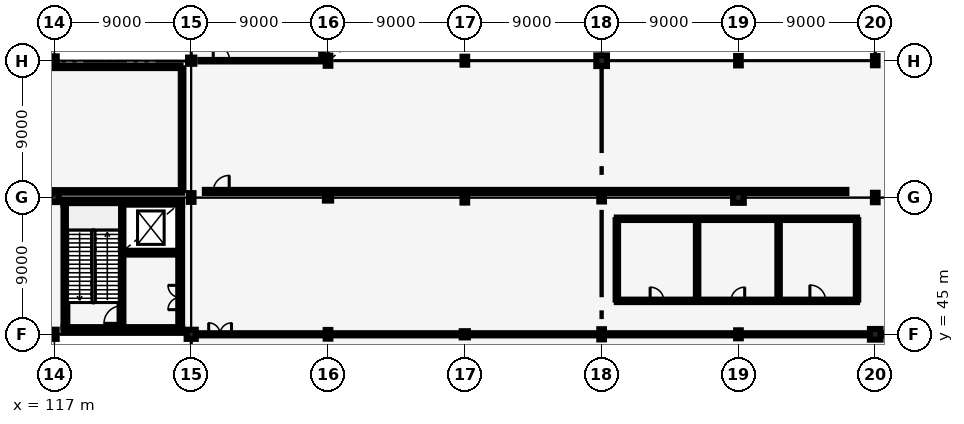
"""IFC4 building model, lengths in metres.
Left out: names, types, materials, properties, quantities, classifications, styles, units other than length and angle.
Written with IfcOpenShell. Run it as: python <this file> out.ifc"""

import sys

from ifc_helpers import new_model, si_unit, direction, frame, frame_2d, origin, origin_2d, place, context, subcontext, project, spatial, rectangle, hollow_circle, i_section, extrude, element, fill, save


model = new_model("IFC4")
c1 = context("Model", 3, precision=1e-05, world=origin(), true_north=direction((0.0, 1.0)))
c2 = subcontext(c1, "Body", "Model", "MODEL_VIEW")
j1 = project(units=[si_unit("LENGTHUNIT", "METRE"), si_unit("PLANEANGLEUNIT", "RADIAN")], contexts=[c1])
p1 = place(None, origin())
s1 = spatial("IfcSite", under=j1, at=p1, CompositionType="ELEMENT")
p2 = place(p1, origin())
s2 = spatial("IfcBuilding", under=s1, at=p2, CompositionType="ELEMENT")
p3 = place(p2, frame((0.0, 0.0, 12.0)))
s3 = spatial("IfcBuildingStorey", under=s2, at=p3, CompositionType="ELEMENT", Elevation=12.0)
p4 = place(p3, frame((117.0, 45.0, 0.0), z_axis=(0.0, 0.0, 1.0), x_axis=(1.0, 0.0, 0.0)))
e1 = element("IfcColumn", 1, at=p4, inside=s3, PredefinedType="COLUMN", context=c2, shape_type="SweptSolid", body=[
    extrude(i_section(OverallWidth=0.3, OverallDepth=0.6, WebThickness=0.015, FlangeThickness=0.03, FilletRadius=0.027, at=origin_2d()), origin(), (0.0, 0.0, 1.0), 6.0),
])
p5 = place(p3, frame((117.0, 54.0, 0.0), z_axis=(0.0, 0.0, 1.0), x_axis=(1.0, 0.0, 0.0)))
e2 = element("IfcColumn", 2, at=p5, inside=s3, PredefinedType="COLUMN", context=c2, shape_type="SweptSolid", body=[
    extrude(rectangle(XDim=0.6, YDim=0.6, at=origin_2d()), origin(), (0.0, 0.0, 1.0), 6.0),
])
p6 = place(p3, frame((117.0, 63.0, 0.0), z_axis=(0.0, 0.0, 1.0), x_axis=(1.0, 0.0, 0.0)))
e3 = element("IfcColumn", 3, at=p6, inside=s3, PredefinedType="COLUMN", context=c2, shape_type="SweptSolid", body=[
    extrude(i_section(OverallWidth=0.306, OverallDepth=0.572, WebThickness=0.021, FlangeThickness=0.04, FilletRadius=0.027, at=origin_2d()), origin(), (0.0, 0.0, 1.0), 5.655),
])
p7 = place(p3, frame((126.0, 45.0, 0.0), z_axis=(0.0, 0.0, 1.0), x_axis=(1.0, 0.0, 0.0)))
e4 = element("IfcColumn", 4, at=p7, inside=s3, PredefinedType="COLUMN", context=c2, shape_type="SweptSolid", body=[
    extrude(rectangle(XDim=0.6, YDim=0.6, at=origin_2d()), origin(), (0.0, 0.0, 1.0), 6.0),
])
p8 = place(p3, frame((126.0, 54.0, 0.0), z_axis=(0.0, 0.0, 1.0), x_axis=(1.0, 0.0, 0.0)))
e5 = element("IfcColumn", 5, at=p8, inside=s3, PredefinedType="COLUMN", context=c2, shape_type="SweptSolid", body=[
    extrude(i_section(OverallWidth=0.306, OverallDepth=0.572, WebThickness=0.021, FlangeThickness=0.04, FilletRadius=0.027, at=origin_2d()), origin(), (0.0, 0.0, 1.0), 6.0),
])
p9 = place(p3, frame((126.0, 63.0, 0.0), z_axis=(0.0, 0.0, 1.0), x_axis=(1.0, 0.0, 0.0)))
e6 = element("IfcColumn", 6, at=p9, inside=s3, PredefinedType="COLUMN", context=c2, shape_type="SweptSolid", body=[
    extrude(hollow_circle(Radius=0.203, WallThickness=0.016, at=origin_2d()), origin(), (0.0, 0.0, 1.0), 6.0),
])
p10 = place(p3, frame((135.0, 45.0, 0.0), z_axis=(0.0, 0.0, 1.0), x_axis=(1.0, 0.0, 0.0)))
e7 = element("IfcColumn", 7, at=p10, inside=s3, PredefinedType="COLUMN", context=c2, shape_type="SweptSolid", body=[
    extrude(i_section(OverallWidth=0.306, OverallDepth=0.572, WebThickness=0.021, FlangeThickness=0.04, FilletRadius=0.027, at=origin_2d()), origin(), (0.0, 0.0, 1.0), 6.0),
])
p11 = place(p3, frame((135.0, 54.0, 0.0), z_axis=(0.0, 0.0, 1.0), x_axis=(1.0, 0.0, 0.0)))
e8 = element("IfcColumn", 8, at=p11, inside=s3, PredefinedType="COLUMN", context=c2, shape_type="SweptSolid", body=[
    extrude(hollow_circle(Radius=0.203, WallThickness=0.016, at=origin_2d()), origin(), (0.0, 0.0, 1.0), 6.0),
])
p12 = place(p3, frame((135.0, 63.0, 0.0), z_axis=(0.0, 0.0, 1.0), x_axis=(1.0, 0.0, 0.0)))
e9 = element("IfcColumn", 9, at=p12, inside=s3, PredefinedType="COLUMN", context=c2, shape_type="SweptSolid", body=[
    extrude(i_section(OverallWidth=0.305, OverallDepth=0.668, WebThickness=0.021, FlangeThickness=0.04, FilletRadius=0.027, at=origin_2d()), origin(), (0.0, 0.0, 1.0), 6.0),
])
p13 = place(p3, frame((144.0, 45.0, 0.0), z_axis=(0.0, 0.0, 1.0), x_axis=(1.0, 0.0, 0.0)))
e10 = element("IfcColumn", 10, at=p13, inside=s3, PredefinedType="COLUMN", context=c2, shape_type="SweptSolid", body=[
    extrude(hollow_circle(Radius=0.203, WallThickness=0.016, at=origin_2d()), origin(), (0.0, 0.0, 1.0), 6.0),
])
p14 = place(p3, frame((144.0, 54.0, 0.0), z_axis=(0.0, 0.0, 1.0), x_axis=(1.0, 0.0, 0.0)))
e11 = element("IfcColumn", 11, at=p14, inside=s3, PredefinedType="COLUMN", context=c2, shape_type="SweptSolid", body=[
    extrude(i_section(OverallWidth=0.305, OverallDepth=0.668, WebThickness=0.021, FlangeThickness=0.04, FilletRadius=0.027, at=origin_2d()), origin(), (0.0, 0.0, 1.0), 6.0),
])
p15 = place(p3, frame((144.0, 63.0, 0.0), z_axis=(0.0, 0.0, 1.0), x_axis=(1.0, 0.0, 0.0)))
e12 = element("IfcColumn", 12, at=p15, inside=s3, PredefinedType="COLUMN", context=c2, shape_type="SweptSolid", body=[
    extrude(i_section(OverallWidth=0.306, OverallDepth=0.524, WebThickness=0.021, FlangeThickness=0.04, FilletRadius=0.027, at=origin_2d()), origin(), (0.0, 0.0, 1.0), 6.0),
])
p16 = place(p3, frame((153.0, 45.0, 0.0), z_axis=(0.0, 0.0, 1.0), x_axis=(1.0, 0.0, 0.0)))
e13 = element("IfcColumn", 13, at=p16, inside=s3, PredefinedType="COLUMN", context=c2, shape_type="SweptSolid", body=[
    extrude(i_section(OverallWidth=0.305, OverallDepth=0.668, WebThickness=0.021, FlangeThickness=0.04, FilletRadius=0.027, at=origin_2d()), origin(), (0.0, 0.0, 1.0), 6.0),
])
p17 = place(p3, frame((153.0, 54.0, 0.0), z_axis=(0.0, 0.0, 1.0), x_axis=(1.0, 0.0, 0.0)))
e14 = element("IfcColumn", 14, at=p17, inside=s3, PredefinedType="COLUMN", context=c2, shape_type="SweptSolid", body=[
    extrude(i_section(OverallWidth=0.306, OverallDepth=0.524, WebThickness=0.021, FlangeThickness=0.04, FilletRadius=0.027, at=origin_2d()), origin(), (0.0, 0.0, 1.0), 6.0),
])
p18 = place(p3, frame((153.0, 63.0, 0.0), z_axis=(0.0, 0.0, 1.0), x_axis=(1.0, 0.0, 0.0)))
e15 = element("IfcColumn", 15, at=p18, inside=s3, PredefinedType="COLUMN", context=c2, shape_type="SweptSolid", body=[
    extrude(rectangle(XDim=0.7, YDim=0.7, at=origin_2d()), origin(), (0.0, 0.0, 1.0), 6.0),
])
p19 = place(p3, frame((162.0, 45.0, 0.0), z_axis=(0.0, 0.0, 1.0), x_axis=(1.0, 0.0, 0.0)))
e16 = element("IfcColumn", 16, at=p19, inside=s3, PredefinedType="COLUMN", context=c2, shape_type="SweptSolid", body=[
    extrude(i_section(OverallWidth=0.306, OverallDepth=0.524, WebThickness=0.021, FlangeThickness=0.04, FilletRadius=0.027, at=origin_2d()), origin(), (0.0, 0.0, 1.0), 6.0),
])
p20 = place(p3, frame((162.0, 54.0, 0.0), z_axis=(0.0, 0.0, 1.0), x_axis=(1.0, 0.0, 0.0)))
e17 = element("IfcColumn", 17, at=p20, inside=s3, PredefinedType="COLUMN", context=c2, shape_type="SweptSolid", body=[
    extrude(rectangle(XDim=0.7, YDim=0.7, at=origin_2d()), origin(), (0.0, 0.0, 1.0), 6.0),
])
p21 = place(p3, frame((162.0, 63.0, 0.0), z_axis=(0.0, 0.0, 1.0), x_axis=(1.0, 0.0, 0.0)))
e18 = element("IfcColumn", 18, at=p21, inside=s3, PredefinedType="COLUMN", context=c2, shape_type="SweptSolid", body=[
    extrude(i_section(OverallWidth=0.305, OverallDepth=0.62, WebThickness=0.021, FlangeThickness=0.04, FilletRadius=0.027, at=origin_2d()), origin(), (0.0, 0.0, 1.0), 6.0),
])
p22 = place(p3, frame((171.0, 45.0, 0.0), z_axis=(0.0, 0.0, 1.0), x_axis=(1.0, 0.0, 0.0)))
e19 = element("IfcColumn", 19, at=p22, inside=s3, PredefinedType="COLUMN", context=c2, shape_type="SweptSolid", body=[
    extrude(rectangle(XDim=0.7, YDim=0.7, at=origin_2d()), origin(), (0.0, 0.0, 1.0), 6.0),
])
p23 = place(p3, frame((171.0, 54.0, 0.0), z_axis=(0.0, 0.0, 1.0), x_axis=(1.0, 0.0, 0.0)))
e20 = element("IfcColumn", 20, at=p23, inside=s3, PredefinedType="COLUMN", context=c2, shape_type="SweptSolid", body=[
    extrude(i_section(OverallWidth=0.305, OverallDepth=0.62, WebThickness=0.021, FlangeThickness=0.04, FilletRadius=0.027, at=origin_2d()), origin(), (0.0, 0.0, 1.0), 6.0),
])
p24 = place(p3, frame((171.0, 63.0, 0.0), z_axis=(0.0, 0.0, 1.0), x_axis=(1.0, 0.0, 0.0)))
e21 = element("IfcColumn", 21, at=p24, inside=s3, PredefinedType="COLUMN", context=c2, shape_type="SweptSolid", body=[
    extrude(i_section(OverallWidth=0.3, OverallDepth=0.6, WebThickness=0.015, FlangeThickness=0.03, FilletRadius=0.027, at=origin_2d()), origin(), (0.0, 0.0, 1.0), 6.0),
])
p25 = place(p3, frame((117.725, 45.47, 0.0), z_axis=(0.0, 0.0, 1.0), x_axis=(0.0, 1.0, 0.0)))
e22 = element("IfcWall", 22, at=p25, inside=s3, PredefinedType="SHEAR", context=c2, shape_type="SweptSolid", body=[
    extrude(rectangle(XDim=8.06, YDim=0.25, at=frame_2d((4.03, 0.0))), origin(), (0.0, 0.0, 1.0), 5.7),
])
p26 = place(p3, frame((125.275, 45.47, 0.0), z_axis=(0.0, 0.0, 1.0), x_axis=(0.0, 1.0, 0.0)))
e23 = element("IfcWall", 23, at=p26, inside=s3, PredefinedType="SHEAR", context=c2, shape_type="SweptSolid", body=[
    extrude(rectangle(XDim=8.06, YDim=0.25, at=frame_2d((4.03, 0.0))), origin(), (0.0, 0.0, 1.0), 5.7),
])
p27 = place(p26, frame((1.15, 0.0, 0.0)))
e24 = element("IfcOpeningElement", 24, at=p27, cuts=e23, PredefinedType="OPENING", context=c2, shape_type="SweptSolid", body=[
    extrude(rectangle(XDim=1.6, YDim=2.2, at=frame_2d((0.8, 1.1))), frame((0.0, 0.135, 0.0), z_axis=(0.0, -1.0, 0.0), x_axis=(1.0, 0.0, 0.0)), (0.0, 0.0, 1.0), 0.27),
])
for number, where, z_axis, x_axis in (
    (25, (117.6, 45.345, 0.0), (0.0, 0.0, 1.0), (1.0, 0.0, 0.0)),
    (26, (117.6, 53.655, 0.0), (0.0, 0.0, 1.0), (1.0, 0.0, 0.0)),
):
    element("IfcWall", number, at=place(p3, frame(where, z_axis=z_axis, x_axis=x_axis)), inside=s3, PredefinedType="SHEAR", context=c2, shape_type="SweptSolid", body=[
        extrude(rectangle(XDim=7.8, YDim=0.25, at=frame_2d((3.9, 0.0))), origin(), (0.0, 0.0, 1.0), 5.7),
    ])
p28 = place(p3, frame((121.415, 45.47, 0.0), z_axis=(0.0, 0.0, 1.0), x_axis=(0.0, 1.0, 0.0)))
e27 = element("IfcWall", 27, at=p28, inside=s3, PredefinedType="SHEAR", context=c2, shape_type="SweptSolid", body=[
    extrude(rectangle(XDim=8.06, YDim=0.25, at=frame_2d((4.03, 0.0))), origin(), (0.0, 0.0, 1.0), 5.7),
])
p29 = place(p28, frame((0.25, 0.0, 0.0)))
e28 = element("IfcOpeningElement", 28, at=p29, cuts=e27, PredefinedType="OPENING", context=c2, shape_type="SweptSolid", body=[
    extrude(rectangle(XDim=1.15, YDim=2.15, at=frame_2d((0.575, 1.075))), frame((0.0, 0.135, 0.0), z_axis=(0.0, -1.0, 0.0), x_axis=(1.0, 0.0, 0.0)), (0.0, 0.0, 1.0), 0.27),
])
p30 = place(p3, frame((121.54, 50.37, 0.0), z_axis=(0.0, 0.0, 1.0), x_axis=(1.0, 0.0, 0.0)))
e29 = element("IfcWall", 29, at=p30, inside=s3, PredefinedType="SHEAR", context=c2, shape_type="SweptSolid", body=[
    extrude(rectangle(XDim=3.61, YDim=0.25, at=frame_2d((1.805, 0.0))), origin(), (0.0, 0.0, 1.0), 5.7),
])
p31 = place(p30, frame((0.95, 0.0, 0.0)))
e30 = element("IfcOpeningElement", 30, at=p31, cuts=e29, PredefinedType="OPENING", context=c2, shape_type="SweptSolid", body=[
    extrude(rectangle(XDim=1.2, YDim=2.2, at=frame_2d((0.6, 1.1))), frame((0.0, 0.135, 0.0), z_axis=(0.0, -1.0, 0.0), x_axis=(1.0, 0.0, 0.0)), (0.0, 0.0, 1.0), 0.27),
])
p32 = place(p3, frame((154.0, 47.2, 0.0), z_axis=(0.0, 0.0, 1.0), x_axis=(1.0, 0.0, 0.0)))
e31 = element("IfcWall", 31, at=p32, inside=s3, PredefinedType="PLUMBINGWALL", context=c2, shape_type="SweptSolid", body=[
    extrude(rectangle(XDim=15.8, YDim=0.16, at=frame_2d((7.9, 0.0))), origin(), (0.0, 0.0, 1.0), 4.75),
])
p33 = place(p32, frame((2.19, 0.0, 0.0)))
e32 = element("IfcOpeningElement", 32, at=p33, cuts=e31, PredefinedType="OPENING", context=c2, shape_type="SweptSolid", body=[
    extrude(rectangle(XDim=0.9, YDim=2.1, at=frame_2d((0.45, 1.05))), frame((0.0, 0.09, 0.0), z_axis=(0.0, -1.0, 0.0), x_axis=(1.0, 0.0, 0.0)), (0.0, 0.0, 1.0), 0.18),
])
p34 = place(p32, frame((7.51, 0.0, 0.0)))
e33 = element("IfcOpeningElement", 33, at=p34, cuts=e31, PredefinedType="OPENING", context=c2, shape_type="SweptSolid", body=[
    extrude(rectangle(XDim=0.9, YDim=2.1, at=frame_2d((0.45, 1.05))), frame((0.0, 0.09, 0.0), z_axis=(0.0, -1.0, 0.0), x_axis=(1.0, 0.0, 0.0)), (0.0, 0.0, 1.0), 0.18),
])
p35 = place(p32, frame((12.7, 0.0, 0.0)))
e34 = element("IfcOpeningElement", 34, at=p35, cuts=e31, PredefinedType="OPENING", context=c2, shape_type="SweptSolid", body=[
    extrude(rectangle(XDim=1.04, YDim=2.15, at=frame_2d((0.52, 1.075))), frame((0.0, 0.09, 0.0), z_axis=(0.0, -1.0, 0.0), x_axis=(1.0, 0.0, 0.0)), (0.0, 0.0, 1.0), 0.18),
])
p36 = place(p3, frame((154.0, 52.6, 0.0), z_axis=(0.0, 0.0, 1.0), x_axis=(1.0, 0.0, 0.0)))
e35 = element("IfcWall", 35, at=p36, inside=s3, PredefinedType="PLUMBINGWALL", context=c2, shape_type="SweptSolid", body=[
    extrude(rectangle(XDim=15.8, YDim=0.16, at=frame_2d((7.9, 0.0))), origin(), (0.0, 0.0, 1.0), 4.75),
])
for number, where, z_axis, x_axis in (
    (36, (154.0, 47.288, 0.0), (0.0, 0.0, 1.0), (0.0, 1.0, 0.0)),
    (37, (159.28, 47.288, 0.0), (0.0, 0.0, 1.0), (0.0, 1.0, 0.0)),
    (38, (164.64, 47.288, 0.0), (0.0, 0.0, 1.0), (0.0, 1.0, 0.0)),
    (39, (169.8, 47.288, 0.0), (0.0, 0.0, 1.0), (0.0, 1.0, 0.0)),
):
    element("IfcWall", number, at=place(p3, frame(where, z_axis=z_axis, x_axis=x_axis)), inside=s3, PredefinedType="PLUMBINGWALL", context=c2, shape_type="SweptSolid", body=[
        extrude(rectangle(XDim=5.224, YDim=0.16, at=frame_2d((2.612, 0.0))), origin(), (0.0, 0.0, 1.0), 4.75),
    ])
p37 = place(p3, frame((126.6, 45.0, 0.0), z_axis=(0.0, 0.0, 1.0), x_axis=(1.0, 0.0, 0.0)))
e40 = element("IfcWall", 40, at=p37, inside=s3, PredefinedType="PARTITIONING", context=c2, shape_type="SweptSolid", body=[
    extrude(rectangle(XDim=64.8, YDim=0.14, at=frame_2d((32.4, 0.0))), origin(), (0.0, 0.0, 1.0), 4.75),
])
p38 = place(p37, frame((0.55, 0.0, 0.0)))
e41 = element("IfcOpeningElement", 41, at=p38, cuts=e40, PredefinedType="OPENING", context=c2, shape_type="SweptSolid", body=[
    extrude(rectangle(XDim=1.5, YDim=2.25, at=frame_2d((0.75, 1.125))), frame((0.0, 0.08, 0.0), z_axis=(0.0, -1.0, 0.0), x_axis=(1.0, 0.0, 0.0)), (0.0, 0.0, 1.0), 0.16),
])
p39 = place(p3, frame((126.9, 54.4, 0.0), z_axis=(0.0, 0.0, 1.0), x_axis=(1.0, 0.0, 0.0)))
e42 = element("IfcWall", 42, at=p39, inside=s3, PredefinedType="SOLIDWALL", context=c2, shape_type="SweptSolid", body=[
    extrude(rectangle(XDim=42.2, YDim=0.2, at=frame_2d((21.1, 0.0))), origin(), (0.0, 0.0, 1.0), 4.75),
])
p40 = place(p39, frame((0.55, 0.0, 0.0)))
e43 = element("IfcOpeningElement", 43, at=p40, cuts=e42, PredefinedType="OPENING", context=c2, shape_type="SweptSolid", body=[
    extrude(rectangle(XDim=1.05, YDim=2.15, at=frame_2d((0.525, 1.075))), frame((0.0, 0.11, 0.0), z_axis=(0.0, -1.0, 0.0), x_axis=(1.0, 0.0, 0.0)), (0.0, 0.0, 1.0), 0.22),
])
p41 = place(p3, frame((126.6, 63.0, 0.0), z_axis=(0.0, 0.0, 1.0), x_axis=(1.0, 0.0, 0.0)))
e44 = element("IfcWall", 44, at=p41, inside=s3, PredefinedType="PARTITIONING", context=c2, shape_type="SweptSolid", body=[
    extrude(rectangle(XDim=8.0, YDim=0.095, at=frame_2d((4.0, 0.0))), origin(), (0.0, 0.0, 1.0), 4.75),
])
p42 = place(p41, frame((0.85, 0.0, 0.0)))
e45 = element("IfcOpeningElement", 45, at=p42, cuts=e44, PredefinedType="OPENING", context=c2, shape_type="SweptSolid", body=[
    extrude(rectangle(XDim=1.08, YDim=2.18, at=frame_2d((0.54, 1.09))), frame((0.0, 0.057, 0.0), z_axis=(0.0, -1.0, 0.0), x_axis=(1.0, 0.0, 0.0)), (0.0, 0.0, 1.0), 0.115),
])
p43 = place(p3, frame((134.6, 63.057, 0.0), z_axis=(0.0, 0.0, 1.0), x_axis=(0.0, 1.0, 0.0)))
e46 = element("IfcWall", 46, at=p43, inside=s3, PredefinedType="PARTITIONING", context=c2, shape_type="SweptSolid", body=[
    extrude(rectangle(XDim=17.686, YDim=0.095, at=frame_2d((8.843, 0.0))), origin(), (0.0, 0.0, 1.0), 4.75),
])
p44 = place(p3, frame((0.6, 54.4, 0.0), z_axis=(0.0, 0.0, 1.0), x_axis=(1.0, 0.0, 0.0)))
e47 = element("IfcWall", 47, at=p44, inside=s3, PredefinedType="PARTITIONING", context=c2, shape_type="SweptSolid", body=[
    extrude(rectangle(XDim=124.8, YDim=0.17, at=frame_2d((62.4, 0.0))), origin(), (0.0, 0.0, 1.0), 4.75),
])
p45 = place(p44, frame((0.85, 0.0, 0.0)))
e48 = element("IfcOpeningElement", 48, at=p45, cuts=e47, PredefinedType="OPENING", context=c2, shape_type="SweptSolid", body=[
    extrude(rectangle(XDim=1.02, YDim=2.15, at=frame_2d((0.51, 1.075))), frame((0.0, 0.095, 0.0), z_axis=(0.0, -1.0, 0.0), x_axis=(1.0, 0.0, 0.0)), (0.0, 0.0, 1.0), 0.19),
])
p46 = place(p3, frame((0.702, 62.6, 0.0), z_axis=(0.0, 0.0, 1.0), x_axis=(1.0, 0.0, 0.0)))
e49 = element("IfcWall", 49, at=p46, inside=s3, PredefinedType="PARTITIONING", context=c2, shape_type="SweptSolid", body=[
    extrude(rectangle(XDim=124.596, YDim=0.17, at=frame_2d((62.298, 0.0))), origin(), (0.0, 0.0, 1.0), 4.75),
])
p47 = place(p3, frame((125.4, 54.502, 0.0), z_axis=(0.0, 0.0, 1.0), x_axis=(0.0, 1.0, 0.0)))
e50 = element("IfcWall", 50, at=p47, inside=s3, PredefinedType="PARTITIONING", context=c2, shape_type="SweptSolid", body=[
    extrude(rectangle(XDim=7.996, YDim=0.17, at=frame_2d((3.998, 0.0))), origin(), (0.0, 0.0, 1.0), 4.75),
])
p48 = place(p29, origin())
e51 = element("IfcDoor", 51, at=p48, inside=s3, OperationType="SINGLE_SWING_LEFT", PredefinedType="DOOR", context=c2, shape_type="SweptSolid", body=[
    extrude(rectangle(XDim=1.15, YDim=2.15, at=frame_2d((0.575, 1.075))), frame((0.0, 0.025, 0.0), z_axis=(0.0, -1.0, 0.0), x_axis=(1.0, 0.0, 0.0)), (0.0, 0.0, 1.0), 0.05),
])
fill(e28, e51)
p49 = place(p31, origin())
e52 = element("IfcDoor", 52, at=p49, inside=s3, OperationType="DOUBLE_DOOR_SLIDING", PredefinedType="DOOR", context=c2, shape_type="SweptSolid", body=[
    extrude(rectangle(XDim=1.2, YDim=2.2, at=frame_2d((0.6, 1.1))), frame((0.0, 0.025, 0.0), z_axis=(0.0, -1.0, 0.0), x_axis=(1.0, 0.0, 0.0)), (0.0, 0.0, 1.0), 0.05),
])
fill(e30, e52)
p50 = place(p27, origin())
e53 = element("IfcDoor", 53, at=p50, inside=s3, OperationType="DOUBLE_DOOR_SINGLE_SWING", PredefinedType="DOOR", context=c2, shape_type="SweptSolid", body=[
    extrude(rectangle(XDim=1.6, YDim=2.2, at=frame_2d((0.8, 1.1))), frame((0.0, 0.025, 0.0), z_axis=(0.0, -1.0, 0.0), x_axis=(1.0, 0.0, 0.0)), (0.0, 0.0, 1.0), 0.05),
])
fill(e24, e53)
p51 = place(p33, origin())
e54 = element("IfcDoor", 54, at=p51, inside=s3, OperationType="SINGLE_SWING_LEFT", PredefinedType="DOOR", context=c2, shape_type="SweptSolid", body=[
    extrude(rectangle(XDim=0.9, YDim=2.1, at=frame_2d((0.45, 1.05))), frame((0.0, 0.025, 0.0), z_axis=(0.0, -1.0, 0.0), x_axis=(1.0, 0.0, 0.0)), (0.0, 0.0, 1.0), 0.05),
])
fill(e32, e54)
p52 = place(p34, origin())
e55 = element("IfcDoor", 55, at=p52, inside=s3, OperationType="SINGLE_SWING_RIGHT", PredefinedType="DOOR", context=c2, shape_type="SweptSolid", body=[
    extrude(rectangle(XDim=0.9, YDim=2.1, at=frame_2d((0.45, 1.05))), frame((0.0, 0.025, 0.0), z_axis=(0.0, -1.0, 0.0), x_axis=(1.0, 0.0, 0.0)), (0.0, 0.0, 1.0), 0.05),
])
fill(e33, e55)
p53 = place(p35, origin())
e56 = element("IfcDoor", 56, at=p53, inside=s3, OperationType="SINGLE_SWING_LEFT", PredefinedType="DOOR", context=c2, shape_type="SweptSolid", body=[
    extrude(rectangle(XDim=1.04, YDim=2.15, at=frame_2d((0.52, 1.075))), frame((0.0, 0.025, 0.0), z_axis=(0.0, -1.0, 0.0), x_axis=(1.0, 0.0, 0.0)), (0.0, 0.0, 1.0), 0.05),
])
fill(e34, e56)
p54 = place(p38, origin())
e57 = element("IfcDoor", 57, at=p54, inside=s3, OperationType="DOUBLE_DOOR_SINGLE_SWING", PredefinedType="DOOR", context=c2, shape_type="SweptSolid", body=[
    extrude(rectangle(XDim=1.5, YDim=2.25, at=frame_2d((0.75, 1.125))), frame((0.0, 0.025, 0.0), z_axis=(0.0, -1.0, 0.0), x_axis=(1.0, 0.0, 0.0)), (0.0, 0.0, 1.0), 0.05),
])
fill(e41, e57)
p55 = place(p40, origin())
e58 = element("IfcDoor", 58, at=p55, inside=s3, OperationType="SINGLE_SWING_RIGHT", PredefinedType="DOOR", context=c2, shape_type="SweptSolid", body=[
    extrude(rectangle(XDim=1.05, YDim=2.15, at=frame_2d((0.525, 1.075))), frame((0.0, 0.025, 0.0), z_axis=(0.0, -1.0, 0.0), x_axis=(1.0, 0.0, 0.0)), (0.0, 0.0, 1.0), 0.05),
])
fill(e43, e58)
p56 = place(p42, origin())
e59 = element("IfcDoor", 59, at=p56, inside=s3, OperationType="SINGLE_SWING_LEFT", PredefinedType="DOOR", context=c2, shape_type="SweptSolid", body=[
    extrude(rectangle(XDim=1.08, YDim=2.18, at=frame_2d((0.54, 1.09))), frame((0.0, 0.025, 0.0), z_axis=(0.0, -1.0, 0.0), x_axis=(1.0, 0.0, 0.0)), (0.0, 0.0, 1.0), 0.05),
])
fill(e45, e59)
save(model, sys.argv[1])
